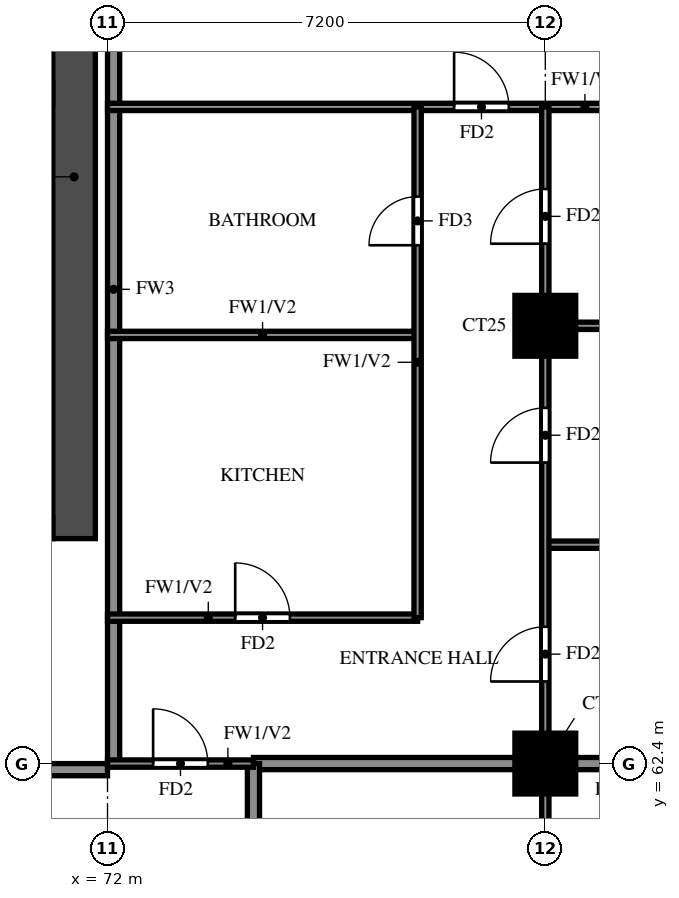
"""IFC4 building model, lengths in metres.
Left out: names, types, materials, properties, quantities, classifications, styles, units other than length and angle.
Written with IfcOpenShell. Run it as: python <this file> out.ifc"""

import sys

from ifc_helpers import new_model, si_unit, direction, frame, frame_2d, origin, origin_2d, place, context, subcontext, project, spatial, rectangle, extrude, source, transform, mapped, element, fill, save


model = new_model("IFC4")
c1 = context("Model", 3, precision=1e-05, world=origin(), true_north=direction((0.0, 1.0)))
c2 = subcontext(c1, "Body", "Model", "MODEL_VIEW")
j1 = project(units=[si_unit("LENGTHUNIT", "METRE"), si_unit("PLANEANGLEUNIT", "RADIAN")], contexts=[c1])
p1 = place(None, origin())
s1 = spatial("IfcSite", under=j1, at=p1, CompositionType="ELEMENT")
p2 = place(p1, origin())
s2 = spatial("IfcBuilding", under=s1, at=p2, CompositionType="ELEMENT")
p3 = place(p2, frame((0.0, 0.0, 153.5)))
s3 = spatial("IfcBuildingStorey", under=s2, at=p3, CompositionType="ELEMENT", Elevation=153.5)
m1 = source(origin(), c2, "Body", "SweptSolid", [
    extrude(rectangle(XDim=1.0, YDim=1.0, at=origin_2d()), origin(), (0.0, 0.0, 1.0), 3.2),
])
for number, where, z_axis, x_axis in (
    (1, (79.2, 62.4, 0.0), (0.0, 0.0, 1.0), (1.0, 0.0, 0.0)),
    (2, (79.2, 69.6, 0.0), (0.0, 0.0, 1.0), (1.0, 0.0, 0.0)),
):
    element("IfcColumn", number, at=place(p3, frame(where, z_axis=z_axis, x_axis=x_axis)), inside=s3, PredefinedType="COLUMN", context=c2, shape_type="MappedRepresentation", body=[
        mapped(m1, transform((0.0, 0.0, 0.0))),
    ])
p4 = place(p3, frame((71.45, 66.1, 0.0), z_axis=(0.0, 0.0, 1.0), x_axis=(0.0, 1.0, 0.0)))
e3 = element("IfcWall", 3, at=p4, inside=s3, PredefinedType="SHEAR", context=c2, shape_type="SweptSolid", body=[
    extrude(rectangle(XDim=11.9, YDim=0.7, at=frame_2d((5.95, 0.0))), origin(), (0.0, 0.0, 1.0), 3.2),
])
p5 = place(p3, frame((29.7, 66.275, 0.0), z_axis=(0.0, 0.0, 1.0), x_axis=(1.0, 0.0, 0.0)))
e4 = element("IfcWall", 4, at=p5, inside=s3, PredefinedType="SHEAR", context=c2, shape_type="SweptSolid", body=[
    extrude(rectangle(XDim=41.4, YDim=0.35, at=frame_2d((20.7, 0.0))), origin(), (0.0, 0.0, 1.0), 3.2),
])
p6 = place(p5, frame((0.925, 0.0, 0.0)))
e5 = element("IfcOpeningElement", 5, at=p6, cuts=e4, PredefinedType="OPENING", context=c2, shape_type="SweptSolid", body=[
    extrude(rectangle(XDim=1.1, YDim=2.1, at=frame_2d((0.55, 1.05))), frame((0.0, 0.185, 0.0), z_axis=(0.0, -1.0, 0.0), x_axis=(1.0, 0.0, 0.0)), (0.0, 0.0, 1.0), 0.37),
])
p7 = place(p5, frame((3.712, 0.0, 0.0)))
e6 = element("IfcOpeningElement", 6, at=p7, cuts=e4, PredefinedType="OPENING", context=c2, shape_type="SweptSolid", body=[
    extrude(rectangle(XDim=1.8, YDim=2.1, at=frame_2d((0.9, 1.05))), frame((0.0, 0.185, 0.0), z_axis=(0.0, -1.0, 0.0), x_axis=(1.0, 0.0, 0.0)), (0.0, 0.0, 1.0), 0.37),
])
p8 = place(p3, frame((67.2, 62.3, 0.0), z_axis=(0.0, 0.0, 1.0), x_axis=(1.0, 0.0, 0.0)))
e7 = element("IfcWall", 7, at=p8, inside=s3, PredefinedType="SOLIDWALL", context=c2, shape_type="SweptSolid", body=[
    extrude(rectangle(XDim=4.8, YDim=0.2, at=frame_2d((2.4, 0.0))), origin(), (0.0, 0.0, 1.0), 3.2),
])
p9 = place(p3, frame((72.1, 62.4, 0.0), z_axis=(0.0, 0.0, 1.0), x_axis=(0.0, 1.0, 0.0)))
e8 = element("IfcWall", 8, at=p9, inside=s3, PredefinedType="SOLIDWALL", context=c2, shape_type="SweptSolid", body=[
    extrude(rectangle(XDim=15.6, YDim=0.2, at=frame_2d((7.8, 0.0))), origin(), (0.0, 0.0, 1.0), 3.2),
])
p10 = place(p3, frame((74.4, 62.4, 0.0), z_axis=(0.0, 0.0, 1.0), x_axis=(1.0, 0.0, 0.0)))
e9 = element("IfcWall", 9, at=p10, inside=s3, PredefinedType="SOLIDWALL", context=c2, shape_type="SweptSolid", body=[
    extrude(rectangle(XDim=11.875, YDim=0.2, at=frame_2d((5.938, 0.0))), origin(), (0.0, 0.0, 1.0), 3.2),
])
p11 = place(p3, frame((74.4, 60.0, 0.0), z_axis=(0.0, 0.0, 1.0), x_axis=(0.0, 1.0, 0.0)))
e10 = element("IfcWall", 10, at=p11, inside=s3, PredefinedType="SOLIDWALL", context=c2, shape_type="SweptSolid", body=[
    extrude(rectangle(XDim=2.4, YDim=0.2, at=frame_2d((1.2, 0.0))), origin(), (0.0, 0.0, 1.0), 3.2),
])
p12 = place(p3, frame((72.0, 62.4, 0.0), z_axis=(0.0, 0.0, 1.0), x_axis=(1.0, 0.0, 0.0)))
e11 = element("IfcWall", 11, at=p12, inside=s3, PredefinedType="PARTITIONING", context=c2, shape_type="SweptSolid", body=[
    extrude(rectangle(XDim=2.4, YDim=0.12, at=frame_2d((1.2, 0.0))), origin(), (0.0, 0.0, 1.0), 3.2),
])
p13 = place(p12, frame((0.75, 0.0, 0.0)))
e12 = element("IfcOpeningElement", 12, at=p13, cuts=e11, PredefinedType="OPENING", context=c2, shape_type="SweptSolid", body=[
    extrude(rectangle(XDim=0.9, YDim=2.1, at=frame_2d((0.45, 1.05))), frame((0.0, 0.07, 0.0), z_axis=(0.0, -1.0, 0.0), x_axis=(1.0, 0.0, 0.0)), (0.0, 0.0, 1.0), 0.14),
])
p14 = place(p3, frame((72.0, 64.8, 0.0), z_axis=(0.0, 0.0, 1.0), x_axis=(1.0, 0.0, 0.0)))
e13 = element("IfcWall", 13, at=p14, inside=s3, PredefinedType="PARTITIONING", context=c2, shape_type="SweptSolid", body=[
    extrude(rectangle(XDim=5.1, YDim=0.12, at=frame_2d((2.55, 0.0))), origin(), (0.0, 0.0, 1.0), 3.2),
])
p15 = place(p14, frame((2.1, 0.0, 0.0)))
e14 = element("IfcOpeningElement", 14, at=p15, cuts=e13, PredefinedType="OPENING", context=c2, shape_type="SweptSolid", body=[
    extrude(rectangle(XDim=0.9, YDim=2.1, at=frame_2d((0.45, 1.05))), frame((0.0, 0.07, 0.0), z_axis=(0.0, -1.0, 0.0), x_axis=(1.0, 0.0, 0.0)), (0.0, 0.0, 1.0), 0.14),
])
p16 = place(p3, frame((79.2, 66.0, 0.0), z_axis=(0.0, 0.0, 1.0), x_axis=(1.0, 0.0, 0.0)))
e15 = element("IfcWall", 15, at=p16, inside=s3, PredefinedType="PARTITIONING", context=c2, shape_type="SweptSolid", body=[
    extrude(rectangle(XDim=7.075, YDim=0.12, at=frame_2d((3.538, 0.0))), origin(), (0.0, 0.0, 1.0), 2.3),
])
p17 = place(p3, frame((72.0, 69.45, 0.0), z_axis=(0.0, 0.0, 1.0), x_axis=(1.0, 0.0, 0.0)))
e16 = element("IfcWall", 16, at=p17, inside=s3, PredefinedType="PARTITIONING", context=c2, shape_type="SweptSolid", body=[
    extrude(rectangle(XDim=5.1, YDim=0.12, at=frame_2d((2.55, 0.0))), origin(), (0.0, 0.0, 1.0), 3.2),
])
p18 = place(p3, frame((79.2, 69.6, 0.0), z_axis=(0.0, 0.0, 1.0), x_axis=(1.0, 0.0, 0.0)))
e17 = element("IfcWall", 17, at=p18, inside=s3, PredefinedType="PARTITIONING", context=c2, shape_type="SweptSolid", body=[
    extrude(rectangle(XDim=7.075, YDim=0.12, at=frame_2d((3.538, 0.0))), origin(), (0.0, 0.0, 1.0), 3.2),
])
p19 = place(p3, frame((72.0, 73.2, 0.0), z_axis=(0.0, 0.0, 1.0), x_axis=(1.0, 0.0, 0.0)))
e18 = element("IfcWall", 18, at=p19, inside=s3, PredefinedType="PARTITIONING", context=c2, shape_type="SweptSolid", body=[
    extrude(rectangle(XDim=14.275, YDim=0.12, at=frame_2d((7.137, 0.0))), origin(), (0.0, 0.0, 1.0), 2.3),
])
p20 = place(p19, frame((5.7, 0.0, 0.0)))
e19 = element("IfcOpeningElement", 19, at=p20, cuts=e18, PredefinedType="OPENING", context=c2, shape_type="SweptSolid", body=[
    extrude(rectangle(XDim=0.9, YDim=2.1, at=frame_2d((0.45, 1.05))), frame((0.0, 0.07, 0.0), z_axis=(0.0, -1.0, 0.0), x_axis=(1.0, 0.0, 0.0)), (0.0, 0.0, 1.0), 0.14),
])
p21 = place(p3, frame((77.1, 64.8, 0.0), z_axis=(0.0, 0.0, 1.0), x_axis=(0.0, 1.0, 0.0)))
e20 = element("IfcWall", 20, at=p21, inside=s3, PredefinedType="PARTITIONING", context=c2, shape_type="SweptSolid", body=[
    extrude(rectangle(XDim=8.4, YDim=0.12, at=frame_2d((4.2, 0.0))), origin(), (0.0, 0.0, 1.0), 3.2),
])
p22 = place(p21, frame((6.125, 0.0, 0.0)))
e21 = element("IfcOpeningElement", 21, at=p22, cuts=e20, PredefinedType="OPENING", context=c2, shape_type="SweptSolid", body=[
    extrude(rectangle(XDim=0.8, YDim=2.1, at=frame_2d((0.4, 1.05))), frame((0.0, 0.07, 0.0), z_axis=(0.0, -1.0, 0.0), x_axis=(1.0, 0.0, 0.0)), (0.0, 0.0, 1.0), 0.14),
])
p23 = place(p3, frame((79.2, 48.125, 0.0), z_axis=(0.0, 0.0, 1.0), x_axis=(0.0, 1.0, 0.0)))
e22 = element("IfcWall", 22, at=p23, inside=s3, PredefinedType="PARTITIONING", context=c2, shape_type="SweptSolid", body=[
    extrude(rectangle(XDim=25.075, YDim=0.12, at=frame_2d((12.538, 0.0))), origin(), (0.0, 0.0, 1.0), 3.2),
])
p24 = place(p23, frame((1.288, 0.0, 0.0)))
e23 = element("IfcOpeningElement", 23, at=p24, cuts=e22, PredefinedType="OPENING", context=c2, shape_type="SweptSolid", body=[
    extrude(rectangle(XDim=0.9, YDim=2.1, at=frame_2d((0.45, 1.05))), frame((0.0, 0.07, 0.0), z_axis=(0.0, -1.0, 0.0), x_axis=(1.0, 0.0, 0.0)), (0.0, 0.0, 1.0), 0.14),
])
p25 = place(p23, frame((4.825, 0.0, 0.0)))
e24 = element("IfcOpeningElement", 24, at=p25, cuts=e22, PredefinedType="OPENING", context=c2, shape_type="SweptSolid", body=[
    extrude(rectangle(XDim=0.9, YDim=2.1, at=frame_2d((0.45, 1.05))), frame((0.0, 0.07, 0.0), z_axis=(0.0, -1.0, 0.0), x_axis=(1.0, 0.0, 0.0)), (0.0, 0.0, 1.0), 0.14),
])
p26 = place(p23, frame((9.925, 0.0, 0.0)))
e25 = element("IfcOpeningElement", 25, at=p26, cuts=e22, PredefinedType="OPENING", context=c2, shape_type="SweptSolid", body=[
    extrude(rectangle(XDim=1.5, YDim=2.1, at=frame_2d((0.75, 1.05))), frame((0.0, 0.07, 0.0), z_axis=(0.0, -1.0, 0.0), x_axis=(1.0, 0.0, 0.0)), (0.0, 0.0, 1.0), 0.14),
])
p27 = place(p23, frame((15.625, 0.0, 0.0)))
e26 = element("IfcOpeningElement", 26, at=p27, cuts=e22, PredefinedType="OPENING", context=c2, shape_type="SweptSolid", body=[
    extrude(rectangle(XDim=0.9, YDim=2.1, at=frame_2d((0.45, 1.05))), frame((0.0, 0.07, 0.0), z_axis=(0.0, -1.0, 0.0), x_axis=(1.0, 0.0, 0.0)), (0.0, 0.0, 1.0), 0.14),
])
p28 = place(p23, frame((19.225, 0.0, 0.0)))
e27 = element("IfcOpeningElement", 27, at=p28, cuts=e22, PredefinedType="OPENING", context=c2, shape_type="SweptSolid", body=[
    extrude(rectangle(XDim=0.9, YDim=2.1, at=frame_2d((0.45, 1.05))), frame((0.0, 0.07, 0.0), z_axis=(0.0, -1.0, 0.0), x_axis=(1.0, 0.0, 0.0)), (0.0, 0.0, 1.0), 0.14),
])
p29 = place(p23, frame((22.825, 0.0, 0.0)))
e28 = element("IfcOpeningElement", 28, at=p29, cuts=e22, PredefinedType="OPENING", context=c2, shape_type="SweptSolid", body=[
    extrude(rectangle(XDim=0.9, YDim=2.1, at=frame_2d((0.45, 1.05))), frame((0.0, 0.07, 0.0), z_axis=(0.0, -1.0, 0.0), x_axis=(1.0, 0.0, 0.0)), (0.0, 0.0, 1.0), 0.14),
])
p30 = place(p13, origin())
e29 = element("IfcDoor", 29, at=p30, inside=s3, OperationType="SINGLE_SWING_LEFT", PredefinedType="DOOR", context=c2, shape_type="SweptSolid", body=[
    extrude(rectangle(XDim=0.9, YDim=2.1, at=frame_2d((0.45, 1.05))), frame((0.0, 0.025, 0.0), z_axis=(0.0, -1.0, 0.0), x_axis=(1.0, 0.0, 0.0)), (0.0, 0.0, 1.0), 0.05),
])
fill(e12, e29)
p31 = place(p27, origin())
e30 = element("IfcDoor", 30, at=p31, inside=s3, OperationType="SINGLE_SWING_RIGHT", PredefinedType="DOOR", context=c2, shape_type="SweptSolid", body=[
    extrude(rectangle(XDim=0.9, YDim=2.1, at=frame_2d((0.45, 1.05))), frame((0.0, 0.025, 0.0), z_axis=(0.0, -1.0, 0.0), x_axis=(1.0, 0.0, 0.0)), (0.0, 0.0, 1.0), 0.05),
])
fill(e26, e30)
p32 = place(p28, origin())
e31 = element("IfcDoor", 31, at=p32, inside=s3, OperationType="SINGLE_SWING_LEFT", PredefinedType="DOOR", context=c2, shape_type="SweptSolid", body=[
    extrude(rectangle(XDim=0.9, YDim=2.1, at=frame_2d((0.45, 1.05))), frame((0.0, 0.025, 0.0), z_axis=(0.0, -1.0, 0.0), x_axis=(1.0, 0.0, 0.0)), (0.0, 0.0, 1.0), 0.05),
])
fill(e27, e31)
p33 = place(p29, origin())
e32 = element("IfcDoor", 32, at=p33, inside=s3, OperationType="SINGLE_SWING_LEFT", PredefinedType="DOOR", context=c2, shape_type="SweptSolid", body=[
    extrude(rectangle(XDim=0.9, YDim=2.1, at=frame_2d((0.45, 1.05))), frame((0.0, 0.025, 0.0), z_axis=(0.0, -1.0, 0.0), x_axis=(1.0, 0.0, 0.0)), (0.0, 0.0, 1.0), 0.05),
])
fill(e28, e32)
p34 = place(p20, origin())
e33 = element("IfcDoor", 33, at=p34, inside=s3, OperationType="SINGLE_SWING_RIGHT", PredefinedType="DOOR", context=c2, shape_type="SweptSolid", body=[
    extrude(rectangle(XDim=0.9, YDim=2.1, at=frame_2d((0.45, 1.05))), frame((0.0, 0.025, 0.0), z_axis=(0.0, -1.0, 0.0), x_axis=(1.0, 0.0, 0.0)), (0.0, 0.0, 1.0), 0.05),
])
fill(e19, e33)
p35 = place(p15, origin())
e34 = element("IfcDoor", 34, at=p35, inside=s3, OperationType="SINGLE_SWING_LEFT", PredefinedType="DOOR", context=c2, shape_type="SweptSolid", body=[
    extrude(rectangle(XDim=0.9, YDim=2.1, at=frame_2d((0.45, 1.05))), frame((0.0, 0.025, 0.0), z_axis=(0.0, -1.0, 0.0), x_axis=(1.0, 0.0, 0.0)), (0.0, 0.0, 1.0), 0.05),
])
fill(e14, e34)
p36 = place(p22, origin())
e35 = element("IfcDoor", 35, at=p36, inside=s3, OperationType="SINGLE_SWING_LEFT", PredefinedType="DOOR", context=c2, shape_type="SweptSolid", body=[
    extrude(rectangle(XDim=0.8, YDim=2.1, at=frame_2d((0.4, 1.05))), frame((0.0, 0.025, 0.0), z_axis=(0.0, -1.0, 0.0), x_axis=(1.0, 0.0, 0.0)), (0.0, 0.0, 1.0), 0.05),
])
fill(e21, e35)
save(model, sys.argv[1])
